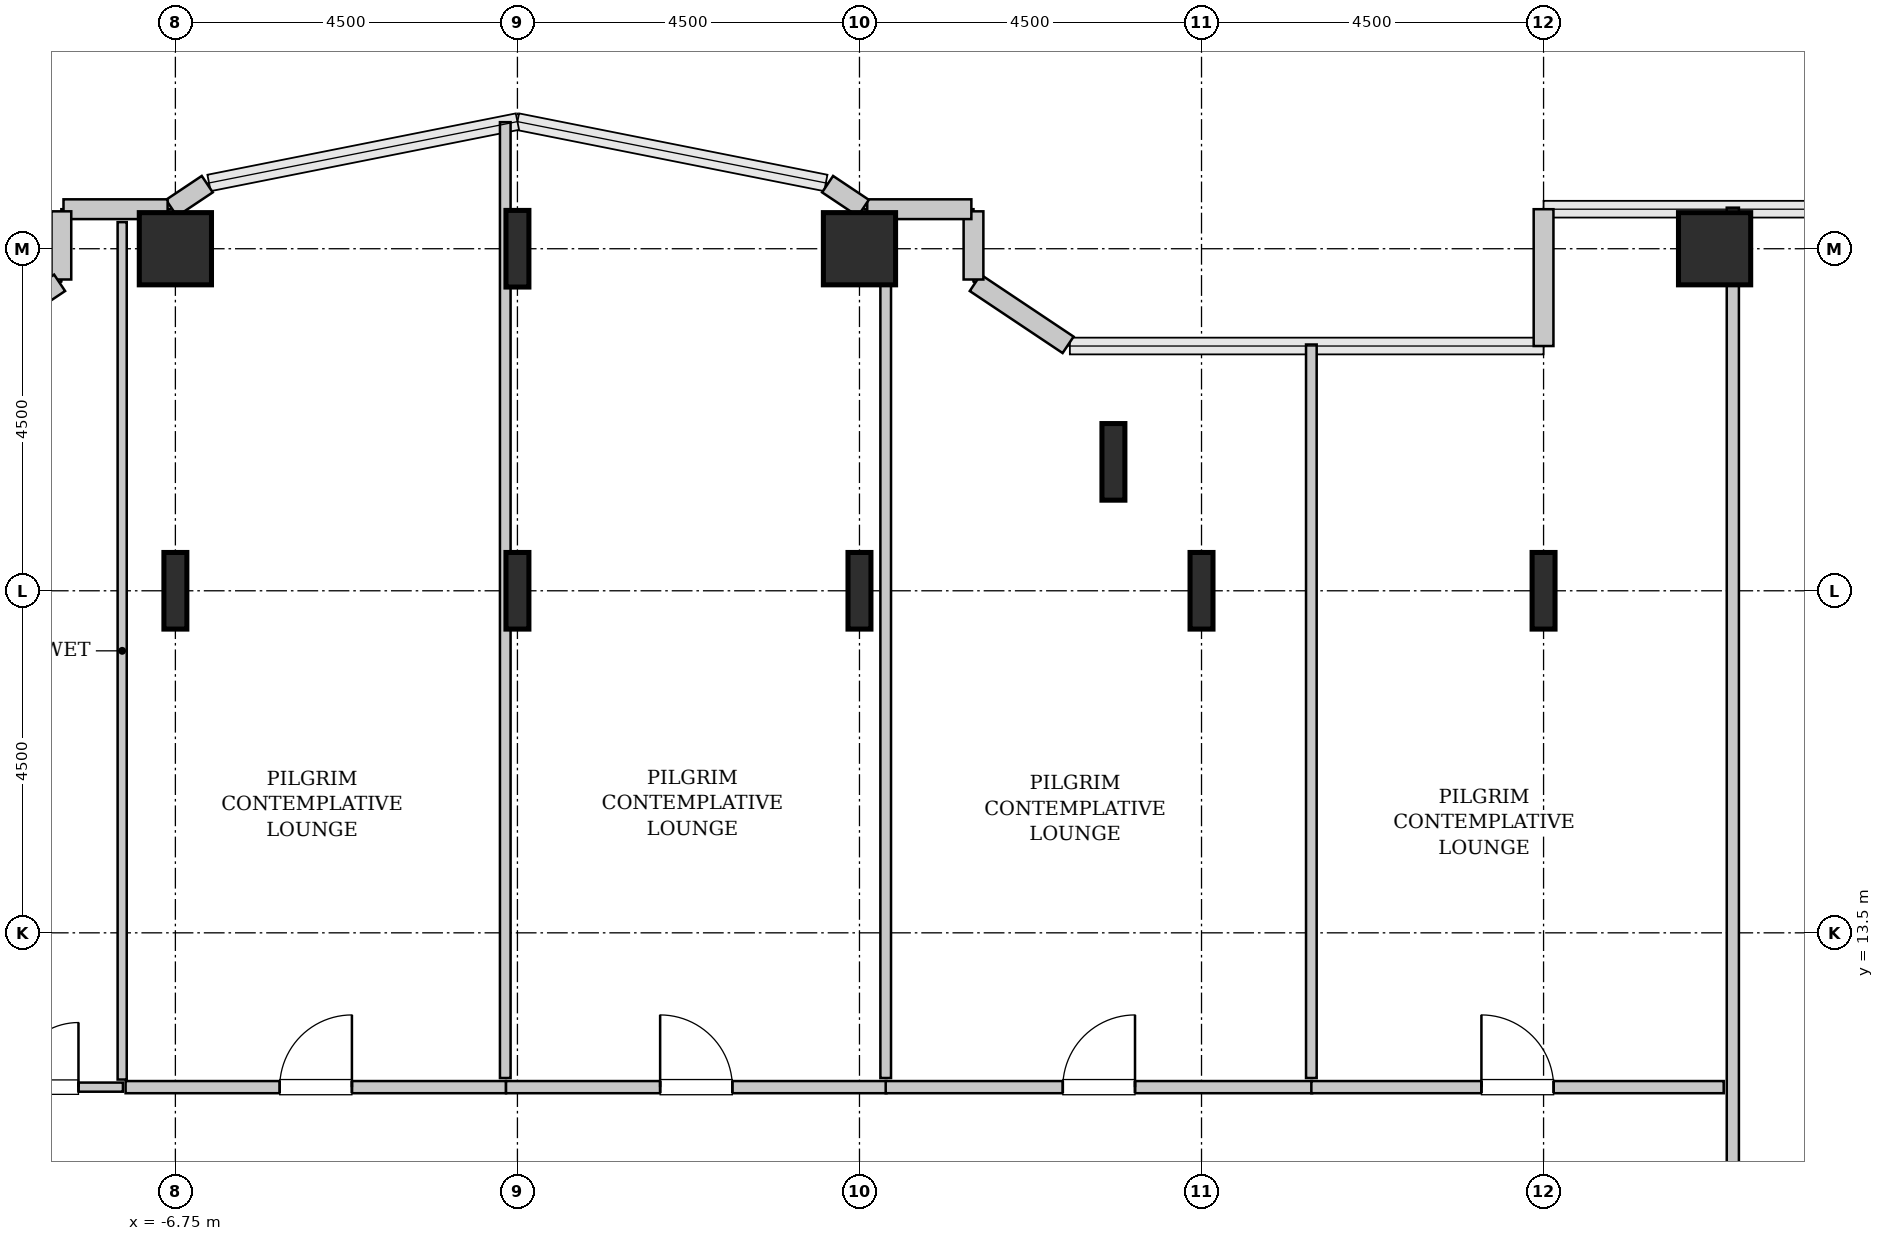
"""IFC4 building model, lengths in metres.
Left out: names, types, materials, properties, quantities, classifications, styles, units other than length and angle.
Written with IfcOpenShell. Run it as: python <this file> out.ifc"""

import sys

from ifc_helpers import new_model, si_unit, direction, frame, frame_2d, origin, origin_2d, place, context, subcontext, project, spatial, rectangle, hollow_rectangle, i_section, extrude, source, transform, mapped, element, fill, save


model = new_model("IFC4")
c1 = context("Model", 3, precision=1e-05, world=origin(), true_north=direction((0.0, 1.0)))
c2 = subcontext(c1, "Body", "Model", "MODEL_VIEW")
j1 = project(units=[si_unit("LENGTHUNIT", "METRE"), si_unit("PLANEANGLEUNIT", "RADIAN")], contexts=[c1])
p1 = place(None, origin())
s1 = spatial("IfcSite", under=j1, at=p1, CompositionType="ELEMENT")
p2 = place(p1, origin())
s2 = spatial("IfcBuilding", under=s1, at=p2, CompositionType="ELEMENT")
p3 = place(p2, frame((0.0, 0.0, 94.6)))
s3 = spatial("IfcBuildingStorey", under=s2, at=p3, CompositionType="ELEMENT", Elevation=94.6)
m1 = source(origin(), c2, "Body", "SweptSolid", [
    extrude(i_section(OverallWidth=0.302, OverallDepth=1.008, WebThickness=0.021, FlangeThickness=0.04, FilletRadius=0.03, at=origin_2d()), origin(), (0.0, 0.0, 1.0), 3.8),
])
p4 = place(p3, frame((-6.75, 18.0, 0.0), z_axis=(0.0, 0.0, 1.0), x_axis=(1.0, 0.0, 0.0)))
e1 = element("IfcColumn", 1, at=p4, inside=s3, PredefinedType="COLUMN", context=c2, shape_type="MappedRepresentation", body=[
    mapped(m1, transform((0.0, 0.0, 0.0), x_axis=(1.0, 0.0, 0.0), y_axis=(0.0, 1.0, 0.0), z_axis=(0.0, 0.0, 1.0), scale=1.0)),
])
m2 = source(origin(), c2, "Body", "SweptSolid", [
    extrude(hollow_rectangle(XDim=0.95, YDim=0.95, WallThickness=0.045, InnerFilletRadius=0.045, OuterFilletRadius=0.09, at=origin_2d()), origin(), (0.0, 0.0, 1.0), 3.8),
])
p5 = place(p3, frame((-6.75, 22.5, 0.0), z_axis=(0.0, 0.0, 1.0), x_axis=(1.0, 0.0, 0.0)))
e2 = element("IfcColumn", 2, at=p5, inside=s3, PredefinedType="COLUMN", context=c2, shape_type="MappedRepresentation", body=[
    mapped(m2, transform((0.0, 0.0, 0.0), x_axis=(1.0, 0.0, 0.0), y_axis=(0.0, 1.0, 0.0), z_axis=(0.0, 0.0, 1.0), scale=1.0)),
])
for number, where, z_axis, x_axis in (
    (3, (-2.25, 18.0, 0.0), (0.0, 0.0, 1.0), (1.0, 0.0, 0.0)),
    (4, (-2.25, 22.5, 0.0), (0.0, 0.0, 1.0), (1.0, 0.0, 0.0)),
    (5, (2.25, 18.0, 0.0), (0.0, 0.0, 1.0), (1.0, 0.0, 0.0)),
):
    element("IfcColumn", number, at=place(p3, frame(where, z_axis=z_axis, x_axis=x_axis)), inside=s3, PredefinedType="COLUMN", context=c2, shape_type="MappedRepresentation", body=[
        mapped(m1, transform((0.0, 0.0, 0.0), x_axis=(1.0, 0.0, 0.0), y_axis=(0.0, 1.0, 0.0), z_axis=(0.0, 0.0, 1.0), scale=1.0)),
    ])
p6 = place(p3, frame((2.25, 22.5, 0.0), z_axis=(0.0, 0.0, 1.0), x_axis=(1.0, 0.0, 0.0)))
e6 = element("IfcColumn", 6, at=p6, inside=s3, PredefinedType="COLUMN", context=c2, shape_type="MappedRepresentation", body=[
    mapped(m2, transform((0.0, 0.0, 0.0), x_axis=(1.0, 0.0, 0.0), y_axis=(0.0, 1.0, 0.0), z_axis=(0.0, 0.0, 1.0), scale=1.0)),
])
for number, where, z_axis, x_axis in (
    (7, (5.591, 19.696, 0.0), (0.0, 0.0, 1.0), (1.0, 0.0, 0.0)),
    (8, (6.75, 18.0, 0.0), (0.0, 0.0, 1.0), (1.0, 0.0, 0.0)),
    (9, (11.25, 18.0, 0.0), (0.0, 0.0, 1.0), (1.0, 0.0, 0.0)),
):
    element("IfcColumn", number, at=place(p3, frame(where, z_axis=z_axis, x_axis=x_axis)), inside=s3, PredefinedType="COLUMN", context=c2, shape_type="MappedRepresentation", body=[
        mapped(m1, transform((0.0, 0.0, 0.0), x_axis=(1.0, 0.0, 0.0), y_axis=(0.0, 1.0, 0.0), z_axis=(0.0, 0.0, 1.0), scale=1.0)),
    ])
p7 = place(p3, frame((13.5, 22.5, 0.0), z_axis=(0.0, 0.0, 1.0), x_axis=(1.0, 0.0, 0.0)))
e10 = element("IfcColumn", 10, at=p7, inside=s3, PredefinedType="COLUMN", context=c2, shape_type="MappedRepresentation", body=[
    mapped(m2, transform((0.0, 0.0, 0.0), x_axis=(1.0, 0.0, 0.0), y_axis=(0.0, 1.0, 0.0), z_axis=(0.0, 0.0, 1.0), scale=1.0)),
])
m3 = source(origin(), c2, "Body", "SweptSolid", [
    extrude(rectangle(XDim=1.8, YDim=0.26, at=frame_2d((0.9, 0.0))), origin(), (0.0, 0.0, 1.0), 3.55),
])
p8 = place(p3, frame((11.25, 23.02, 0.0), z_axis=(0.0, 0.0, 1.0), x_axis=(0.0, -1.0, 0.0)))
e11 = element("IfcWall", 11, at=p8, inside=s3, PredefinedType="SOLIDWALL", context=c2, shape_type="MappedRepresentation", body=[
    mapped(m3, transform((0.0, 0.0, 0.0), x_axis=(1.0, 0.0, 0.0), y_axis=(0.0, 1.0, 0.0), z_axis=(0.0, 0.0, 1.0), scale=1.0)),
])
m4 = source(origin(), c2, "Body", "SweptSolid", [
    extrude(rectangle(XDim=1.469, YDim=0.26, at=frame_2d((0.734, 0.0))), origin(), (0.0, 0.0, 1.0), 3.55),
])
p9 = place(p3, frame((4.995, 21.236, 0.0), z_axis=(0.0, 0.0, 1.0), x_axis=(-0.831461760506, 0.555581983884, 0.0)))
e12 = element("IfcWall", 12, at=p9, inside=s3, PredefinedType="SOLIDWALL", context=c2, shape_type="MappedRepresentation", body=[
    mapped(m4, transform((0.0, 0.0, 0.0), x_axis=(1.0, 0.0, 0.0), y_axis=(0.0, 1.0, 0.0), z_axis=(0.0, 0.0, 1.0), scale=1.0)),
])
m5 = source(origin(), c2, "Body", "SweptSolid", [
    extrude(rectangle(XDim=0.897, YDim=0.26, at=frame_2d((0.448, 0.0))), origin(), (0.0, 0.0, 1.0), 3.55),
])
p10 = place(p3, frame((3.75, 22.095, 0.0), z_axis=(0.0, 0.0, 1.0), x_axis=(0.0, 1.0, 0.0)))
e13 = element("IfcWall", 13, at=p10, inside=s3, PredefinedType="SOLIDWALL", context=c2, shape_type="MappedRepresentation", body=[
    mapped(m5, transform((0.0, 0.0, 0.0), x_axis=(1.0, 0.0, 0.0), y_axis=(0.0, 1.0, 0.0), z_axis=(0.0, 0.0, 1.0), scale=1.0)),
])
m6 = source(origin(), c2, "Body", "SweptSolid", [
    extrude(rectangle(XDim=1.37, YDim=0.26, at=frame_2d((0.685, 0.0))), origin(), (0.0, 0.0, 1.0), 3.55),
])
p11 = place(p3, frame((3.722, 23.02, 0.0), z_axis=(0.0, 0.0, 1.0), x_axis=(-1.0, 0.0, 0.0)))
e14 = element("IfcWall", 14, at=p11, inside=s3, PredefinedType="SOLIDWALL", context=c2, shape_type="MappedRepresentation", body=[
    mapped(m6, transform((0.0, 0.0, 0.0), x_axis=(1.0, 0.0, 0.0), y_axis=(0.0, 1.0, 0.0), z_axis=(0.0, 0.0, 1.0), scale=1.0)),
])
m7 = source(origin(), c2, "Body", "SweptSolid", [
    extrude(rectangle(XDim=0.565, YDim=0.26, at=frame_2d((0.283, 0.0))), origin(), (0.0, 0.0, 1.0), 3.55),
])
for number, where, z_axis, x_axis in (
    (15, (2.301, 23.036, 0.0), (0.0, 0.0, 1.0), (-0.832, 0.555, 0.0)),
    (16, (-6.331, 23.35, 0.0), (0.0, 0.0, 1.0), (-0.832, -0.555, 0.0)),
):
    element("IfcWall", number, at=place(p3, frame(where, z_axis=z_axis, x_axis=x_axis)), inside=s3, PredefinedType="SOLIDWALL", context=c2, shape_type="MappedRepresentation", body=[
        mapped(m7, transform((0.0, 0.0, 0.0), x_axis=(1.0, 0.0, 0.0), y_axis=(0.0, 1.0, 0.0), z_axis=(0.0, 0.0, 1.0), scale=1.0)),
    ])
p12 = place(p3, frame((-6.852, 23.02, 0.0), z_axis=(0.0, 0.0, 1.0), x_axis=(-1.0, 0.0, 0.0)))
e17 = element("IfcWall", 17, at=p12, inside=s3, PredefinedType="SOLIDWALL", context=c2, shape_type="MappedRepresentation", body=[
    mapped(m6, transform((0.0, 0.0, 0.0), x_axis=(1.0, 0.0, 0.0), y_axis=(0.0, 1.0, 0.0), z_axis=(0.0, 0.0, 1.0), scale=1.0)),
])
p13 = place(p3, frame((-8.25, 22.992, 0.0), z_axis=(0.0, 0.0, 1.0), x_axis=(0.0, -1.0, 0.0)))
e18 = element("IfcWall", 18, at=p13, inside=s3, PredefinedType="SOLIDWALL", context=c2, shape_type="MappedRepresentation", body=[
    mapped(m5, transform((0.0, 0.0, 0.0), x_axis=(1.0, 0.0, 0.0), y_axis=(0.0, 1.0, 0.0), z_axis=(0.0, 0.0, 1.0), scale=1.0)),
])
p14 = place(p3, frame((-8.273, 22.052, 0.0), z_axis=(0.0, 0.0, 1.0), x_axis=(-0.831461760506, -0.555581983884, 0.0)))
e19 = element("IfcWall", 19, at=p14, inside=s3, PredefinedType="SOLIDWALL", context=c2, shape_type="MappedRepresentation", body=[
    mapped(m4, transform((0.0, 0.0, 0.0), x_axis=(1.0, 0.0, 0.0), y_axis=(0.0, 1.0, 0.0), z_axis=(0.0, 0.0, 1.0), scale=1.0)),
])
m8 = source(origin(), c2, "Body", "SweptSolid", [
    extrude(rectangle(XDim=2.02, YDim=0.12, at=frame_2d((1.01, 0.0))), origin(), (0.0, 0.0, 1.0), 3.535),
])
p15 = place(p3, frame((-9.46, 11.47, 0.0), z_axis=(0.0, 0.0, 1.0), x_axis=(1.0, 0.0, 0.0)))
e20 = element("IfcWall", 20, at=p15, inside=s3, PredefinedType="PLUMBINGWALL", context=c2, shape_type="MappedRepresentation", body=[
    mapped(m8, transform((0.0, 0.0, 0.0), x_axis=(1.0, 0.0, 0.0), y_axis=(0.0, 1.0, 0.0), z_axis=(0.0, 0.0, 1.0), scale=1.0)),
])
p16 = place(p15, frame((0.585, 0.0, 0.0)))
e21 = element("IfcOpeningElement", 21, at=p16, cuts=e20, PredefinedType="OPENING", context=c2, shape_type="SweptSolid", body=[
    extrude(rectangle(XDim=0.85, YDim=2.1, at=frame_2d((0.425, 1.05))), frame((0.0, 0.07, 0.0), z_axis=(0.0, -1.0, 0.0), x_axis=(1.0, 0.0, 0.0)), (0.0, 0.0, 1.0), 0.14),
])
m9 = source(origin(), c2, "Body", "SweptSolid", [
    extrude(rectangle(XDim=11.28, YDim=0.12, at=frame_2d((5.64, 0.0))), origin(), (0.0, 0.0, 1.0), 3.535),
])
p17 = place(p3, frame((-7.45, 11.57, 0.0), z_axis=(0.0, 0.0, 1.0), x_axis=(0.0, 1.0, 0.0)))
e22 = element("IfcWall", 22, at=p17, inside=s3, PredefinedType="PLUMBINGWALL", context=c2, shape_type="MappedRepresentation", body=[
    mapped(m9, transform((0.0, 0.0, 0.0), x_axis=(1.0, 0.0, 0.0), y_axis=(0.0, 1.0, 0.0), z_axis=(0.0, 0.0, 1.0), scale=1.0)),
])
m10 = source(origin(), c2, "Body", "SweptSolid", [
    extrude(rectangle(XDim=16.135, YDim=0.16, at=frame_2d((8.067, 0.0))), origin(), (0.0, 0.0, 1.0), 3.535),
])
p18 = place(p3, frame((13.74, 6.905, 0.0), z_axis=(0.0, 0.0, 1.0), x_axis=(0.0, 1.0, 0.0)))
e23 = element("IfcWall", 23, at=p18, inside=s3, PredefinedType="PARTITIONING", context=c2, shape_type="MappedRepresentation", body=[
    mapped(m10, transform((0.0, 0.0, 0.0), x_axis=(1.0, 0.0, 0.0), y_axis=(0.0, 1.0, 0.0), z_axis=(0.0, 0.0, 1.0), scale=1.0)),
])
p19 = place(p18, frame((1.827, 0.0, 0.0)))
e24 = element("IfcOpeningElement", 24, at=p19, cuts=e23, PredefinedType="OPENING", context=c2, shape_type="SweptSolid", body=[
    extrude(rectangle(XDim=0.95, YDim=2.1, at=frame_2d((0.475, 1.05))), frame((0.0, 0.09, 0.0), z_axis=(0.0, -1.0, 0.0), x_axis=(1.0, 0.0, 0.0)), (0.0, 0.0, 1.0), 0.18),
])
m11 = source(origin(), c2, "Body", "SweptSolid", [
    extrude(rectangle(XDim=5.005, YDim=0.16, at=frame_2d((2.502, 0.0))), origin(), (0.0, 0.0, 1.0), 3.535),
])
p20 = place(p3, frame((-7.405, 11.47, 0.0), z_axis=(0.0, 0.0, 1.0), x_axis=(1.0, 0.0, 0.0)))
e25 = element("IfcWall", 25, at=p20, inside=s3, PredefinedType="PARTITIONING", context=c2, shape_type="MappedRepresentation", body=[
    mapped(m11, transform((0.0, 0.0, 0.0), x_axis=(1.0, 0.0, 0.0), y_axis=(0.0, 1.0, 0.0), z_axis=(0.0, 0.0, 1.0), scale=1.0)),
])
p21 = place(p20, frame((2.028, 0.0, 0.0)))
e26 = element("IfcOpeningElement", 26, at=p21, cuts=e25, PredefinedType="OPENING", context=c2, shape_type="SweptSolid", body=[
    extrude(rectangle(XDim=0.95, YDim=2.1, at=frame_2d((0.475, 1.05))), frame((0.0, 0.09, 0.0), z_axis=(0.0, -1.0, 0.0), x_axis=(1.0, 0.0, 0.0)), (0.0, 0.0, 1.0), 0.18),
])
m12 = source(origin(), c2, "Body", "SweptSolid", [
    extrude(rectangle(XDim=12.575, YDim=0.14, at=frame_2d((6.287, 0.0))), origin(), (0.0, 0.0, 1.0), 2.825),
])
p22 = place(p3, frame((-2.41, 11.59, 0.0), z_axis=(0.0, 0.0, 1.0), x_axis=(0.0, 1.0, 0.0)))
e27 = element("IfcWall", 27, at=p22, inside=s3, PredefinedType="PARTITIONING", context=c2, shape_type="MappedRepresentation", body=[
    mapped(m12, transform((0.0, 0.0, 0.0), x_axis=(1.0, 0.0, 0.0), y_axis=(0.0, 1.0, 0.0), z_axis=(0.0, 0.0, 1.0), scale=1.0)),
])
m13 = source(origin(), c2, "Body", "SweptSolid", [
    extrude(rectangle(XDim=5.005, YDim=0.16, at=frame_2d((2.502, 0.0))), origin(), (0.0, 0.0, 1.0), 3.535),
])
p23 = place(p3, frame((-2.4, 11.47, 0.0), z_axis=(0.0, 0.0, 1.0), x_axis=(1.0, 0.0, 0.0)))
e28 = element("IfcWall", 28, at=p23, inside=s3, PredefinedType="PARTITIONING", context=c2, shape_type="MappedRepresentation", body=[
    mapped(m13, transform((0.0, 0.0, 0.0), x_axis=(1.0, 0.0, 0.0), y_axis=(0.0, 1.0, 0.0), z_axis=(0.0, 0.0, 1.0), scale=1.0)),
])
p24 = place(p23, frame((2.028, 0.0, 0.0)))
e29 = element("IfcOpeningElement", 29, at=p24, cuts=e28, PredefinedType="OPENING", context=c2, shape_type="SweptSolid", body=[
    extrude(rectangle(XDim=0.95, YDim=2.1, at=frame_2d((0.475, 1.05))), frame((0.0, 0.09, 0.0), z_axis=(0.0, -1.0, 0.0), x_axis=(1.0, 0.0, 0.0)), (0.0, 0.0, 1.0), 0.18),
])
m14 = source(origin(), c2, "Body", "SweptSolid", [
    extrude(rectangle(XDim=11.26, YDim=0.14, at=frame_2d((5.63, 0.0))), origin(), (0.0, 0.0, 1.0), 2.825),
])
p25 = place(p3, frame((2.595, 11.59, 0.0), z_axis=(0.0, 0.0, 1.0), x_axis=(0.0, 1.0, 0.0)))
e30 = element("IfcWall", 30, at=p25, inside=s3, PredefinedType="PARTITIONING", context=c2, shape_type="MappedRepresentation", body=[
    mapped(m14, transform((0.0, 0.0, 0.0), x_axis=(1.0, 0.0, 0.0), y_axis=(0.0, 1.0, 0.0), z_axis=(0.0, 0.0, 1.0), scale=1.0)),
])
m15 = source(origin(), c2, "Body", "SweptSolid", [
    extrude(rectangle(XDim=5.61, YDim=0.16, at=frame_2d((2.805, 0.0))), origin(), (0.0, 0.0, 1.0), 3.535),
])
p26 = place(p3, frame((2.595, 11.47, 0.0), z_axis=(0.0, 0.0, 1.0), x_axis=(1.0, 0.0, 0.0)))
e31 = element("IfcWall", 31, at=p26, inside=s3, PredefinedType="PARTITIONING", context=c2, shape_type="MappedRepresentation", body=[
    mapped(m15, transform((0.0, 0.0, 0.0), x_axis=(1.0, 0.0, 0.0), y_axis=(0.0, 1.0, 0.0), z_axis=(0.0, 0.0, 1.0), scale=1.0)),
])
p27 = place(p26, frame((2.33, 0.0, 0.0)))
e32 = element("IfcOpeningElement", 32, at=p27, cuts=e31, PredefinedType="OPENING", context=c2, shape_type="SweptSolid", body=[
    extrude(rectangle(XDim=0.95, YDim=2.1, at=frame_2d((0.475, 1.05))), frame((0.0, 0.09, 0.0), z_axis=(0.0, -1.0, 0.0), x_axis=(1.0, 0.0, 0.0)), (0.0, 0.0, 1.0), 0.18),
])
m16 = source(origin(), c2, "Body", "SweptSolid", [
    extrude(rectangle(XDim=9.65, YDim=0.14, at=frame_2d((4.825, 0.0))), origin(), (0.0, 0.0, 1.0), 3.535),
])
p28 = place(p3, frame((8.195, 11.59, 0.0), z_axis=(0.0, 0.0, 1.0), x_axis=(0.0, 1.0, 0.0)))
e33 = element("IfcWall", 33, at=p28, inside=s3, PredefinedType="PARTITIONING", context=c2, shape_type="MappedRepresentation", body=[
    mapped(m16, transform((0.0, 0.0, 0.0), x_axis=(1.0, 0.0, 0.0), y_axis=(0.0, 1.0, 0.0), z_axis=(0.0, 0.0, 1.0), scale=1.0)),
])
m17 = source(origin(), c2, "Body", "SweptSolid", [
    extrude(rectangle(XDim=5.425, YDim=0.16, at=frame_2d((2.712, 0.0))), origin(), (0.0, 0.0, 1.0), 3.535),
])
p29 = place(p3, frame((8.195, 11.47, 0.0), z_axis=(0.0, 0.0, 1.0), x_axis=(1.0, 0.0, 0.0)))
e34 = element("IfcWall", 34, at=p29, inside=s3, PredefinedType="PARTITIONING", context=c2, shape_type="MappedRepresentation", body=[
    mapped(m17, transform((0.0, 0.0, 0.0), x_axis=(1.0, 0.0, 0.0), y_axis=(0.0, 1.0, 0.0), z_axis=(0.0, 0.0, 1.0), scale=1.0)),
])
p30 = place(p29, frame((2.238, 0.0, 0.0)))
e35 = element("IfcOpeningElement", 35, at=p30, cuts=e34, PredefinedType="OPENING", context=c2, shape_type="SweptSolid", body=[
    extrude(rectangle(XDim=0.95, YDim=2.1, at=frame_2d((0.475, 1.05))), frame((0.0, 0.09, 0.0), z_axis=(0.0, -1.0, 0.0), x_axis=(1.0, 0.0, 0.0)), (0.0, 0.0, 1.0), 0.18),
])
m18 = source(origin(), c2, "Body", "SweptSolid", [
    extrude(rectangle(XDim=0.85, YDim=2.1, at=frame_2d((0.425, 1.05))), frame((0.0, 0.025, 0.0), z_axis=(0.0, -1.0, 0.0), x_axis=(1.0, 0.0, 0.0)), (0.0, 0.0, 1.0), 0.05),
])
p31 = place(p16, origin())
e36 = element("IfcDoor", 36, at=p31, inside=s3, OperationType="SINGLE_SWING_RIGHT", PredefinedType="DOOR", context=c2, shape_type="MappedRepresentation", body=[
    mapped(m18, transform((0.0, 0.0, 0.0), x_axis=(1.0, 0.0, 0.0), y_axis=(0.0, 1.0, 0.0), z_axis=(0.0, 0.0, 1.0), scale=1.0)),
])
fill(e21, e36)
m19 = source(origin(), c2, "Body", "SweptSolid", [
    extrude(rectangle(XDim=0.95, YDim=2.1, at=frame_2d((0.475, 1.05))), frame((0.0, 0.025, 0.0), z_axis=(0.0, -1.0, 0.0), x_axis=(1.0, 0.0, 0.0)), (0.0, 0.0, 1.0), 0.05),
])
p32 = place(p21, origin())
e37 = element("IfcDoor", 37, at=p32, inside=s3, OperationType="SINGLE_SWING_RIGHT", PredefinedType="DOOR", context=c2, shape_type="MappedRepresentation", body=[
    mapped(m19, transform((0.0, 0.0, 0.0), x_axis=(1.0, 0.0, 0.0), y_axis=(0.0, 1.0, 0.0), z_axis=(0.0, 0.0, 1.0), scale=1.0)),
])
fill(e26, e37)
p33 = place(p24, origin())
e38 = element("IfcDoor", 38, at=p33, inside=s3, OperationType="SINGLE_SWING_LEFT", PredefinedType="DOOR", context=c2, shape_type="MappedRepresentation", body=[
    mapped(m19, transform((0.0, 0.0, 0.0), x_axis=(1.0, 0.0, 0.0), y_axis=(0.0, 1.0, 0.0), z_axis=(0.0, 0.0, 1.0), scale=1.0)),
])
fill(e29, e38)
p34 = place(p27, origin())
e39 = element("IfcDoor", 39, at=p34, inside=s3, OperationType="SINGLE_SWING_RIGHT", PredefinedType="DOOR", context=c2, shape_type="MappedRepresentation", body=[
    mapped(m19, transform((0.0, 0.0, 0.0), x_axis=(1.0, 0.0, 0.0), y_axis=(0.0, 1.0, 0.0), z_axis=(0.0, 0.0, 1.0), scale=1.0)),
])
fill(e32, e39)
p35 = place(p30, origin())
e40 = element("IfcDoor", 40, at=p35, inside=s3, OperationType="SINGLE_SWING_LEFT", PredefinedType="DOOR", context=c2, shape_type="MappedRepresentation", body=[
    mapped(m19, transform((0.0, 0.0, 0.0), x_axis=(1.0, 0.0, 0.0), y_axis=(0.0, 1.0, 0.0), z_axis=(0.0, 0.0, 1.0), scale=1.0)),
])
fill(e35, e40)
save(model, sys.argv[1])
